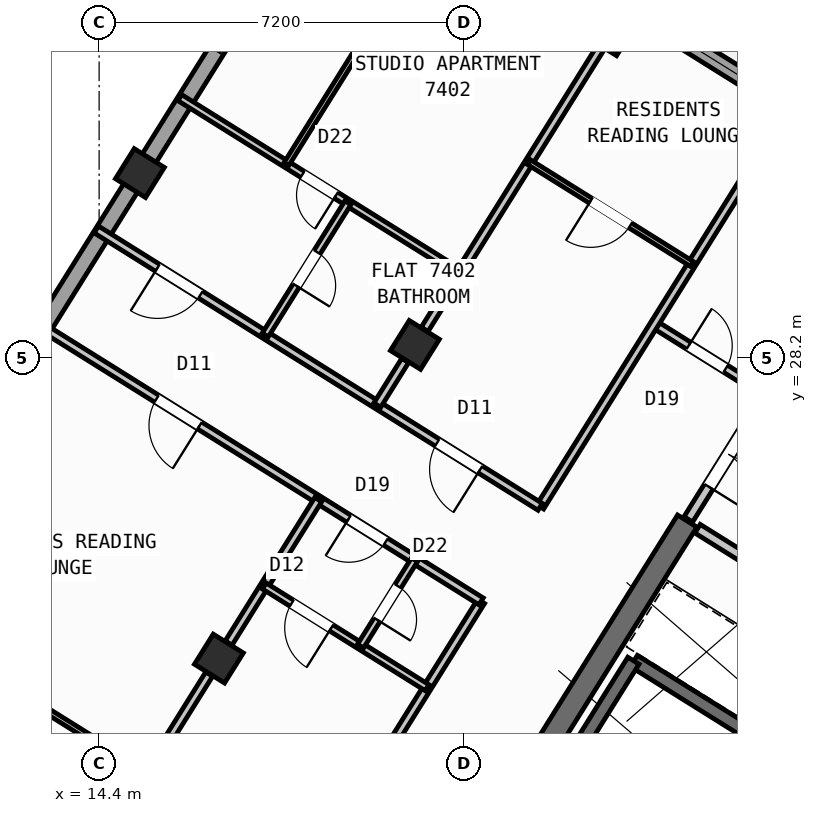
"""IFC4 building model, lengths in metres.
Left out: names, types, materials, properties, quantities, classifications, styles, units other than length and angle.
Written with IfcOpenShell. Run it as: python <this file> out.ifc"""

import sys

from ifc_helpers import new_model, si_unit, direction, frame, frame_2d, origin, origin_2d, place, context, subcontext, project, spatial, rectangle, hollow_rectangle, extrude, source, transform, mapped, element, fill, save


model = new_model("IFC4")
c1 = context("Model", 3, precision=1e-05, world=origin(), true_north=direction((0.0, 1.0)))
c2 = subcontext(c1, "Body", "Model", "MODEL_VIEW")
j1 = project(units=[si_unit("LENGTHUNIT", "METRE"), si_unit("PLANEANGLEUNIT", "RADIAN")], contexts=[c1])
p1 = place(None, origin())
s1 = spatial("IfcSite", under=j1, at=p1, CompositionType="ELEMENT")
p2 = place(p1, origin())
s2 = spatial("IfcBuilding", under=s1, at=p2, CompositionType="ELEMENT")
p3 = place(p2, frame((0.0, 0.0, 291.6)))
s3 = spatial("IfcBuildingStorey", under=s2, at=p3, CompositionType="ELEMENT", Elevation=291.6)
p4 = place(p3, frame((26.007, 24.976, 0.0), z_axis=(0.0, 0.0, 1.0), x_axis=(-0.529931155655, -0.848040665456, 0.0)))
e1 = element("IfcWall", 1, at=p4, inside=s3, PredefinedType="SHEAR", context=c2, shape_type="SweptSolid", body=[
    extrude(rectangle(XDim=6.475, YDim=0.45, at=frame_2d((3.238, 0.0))), origin(), (0.0, 0.0, 1.0), 3.35),
])
m1 = source(origin(), c2, "Body", "SweptSolid", [
    extrude(hollow_rectangle(XDim=0.7, YDim=0.7, WallThickness=0.028, at=origin_2d()), origin(), (0.0, 0.0, 1.0), 3.6),
])
for number, where, z_axis, x_axis in (
    (2, (24.5, 34.643, 0.0), (0.0, 0.0, 1.0), (-0.848, 0.53, 0.0)),
    (3, (20.632, 28.452, 0.0), (0.0, 0.0, 1.0), (-0.848, 0.53, 0.0)),
    (4, (16.764, 22.261, 0.0), (0.0, 0.0, 1.0), (-0.848, 0.53, 0.0)),
    (5, (15.205, 31.844, 0.0), (0.0, 0.0, 1.0), (-0.848, 0.53, 0.0)),
):
    element("IfcColumn", number, at=place(p3, frame(where, z_axis=z_axis, x_axis=x_axis)), inside=s3, PredefinedType="COLUMN", context=c2, shape_type="MappedRepresentation", body=[
        mapped(m1, transform((0.0, 0.0, 0.0), scale=1.0)),
    ])
p5 = place(p3, frame((7.842, 20.061, 0.0), z_axis=(0.0, 0.0, 1.0), x_axis=(0.529915577903, 0.84805039962, 0.0)))
e6 = element("IfcWall", 6, at=p5, inside=s3, PredefinedType="STANDARD", context=c2, shape_type="SweptSolid", body=[
    extrude(rectangle(XDim=21.587, YDim=0.32, at=frame_2d((10.794, 0.0))), origin(), (0.0, 0.0, 1.0), 2.875),
])
p6 = place(p5, frame((1.368, 0.0, 0.9)))
e7 = element("IfcOpeningElement", 7, at=p6, cuts=e6, PredefinedType="OPENING", context=c2, shape_type="SweptSolid", body=[
    extrude(rectangle(XDim=1.65, YDim=1.45, at=frame_2d((0.825, 0.725))), frame((0.0, 0.17, 0.0), z_axis=(0.0, -1.0, 0.0), x_axis=(1.0, 0.0, 0.0)), (0.0, 0.0, 1.0), 0.34),
])
p7 = place(p5, frame((4.71, 0.0, 1.0)))
e8 = element("IfcOpeningElement", 8, at=p7, cuts=e6, PredefinedType="OPENING", context=c2, shape_type="SweptSolid", body=[
    extrude(rectangle(XDim=0.9, YDim=1.25, at=frame_2d((0.45, 0.625))), frame((0.0, 0.17, 0.0), z_axis=(0.0, -1.0, 0.0), x_axis=(1.0, 0.0, 0.0)), (0.0, 0.0, 1.0), 0.34),
])
p8 = place(p5, frame((7.554, 0.0, 0.95)))
e9 = element("IfcOpeningElement", 9, at=p8, cuts=e6, PredefinedType="OPENING", context=c2, shape_type="SweptSolid", body=[
    extrude(rectangle(XDim=1.95, YDim=1.35, at=frame_2d((0.975, 0.675))), frame((0.0, 0.17, 0.0), z_axis=(0.0, -1.0, 0.0), x_axis=(1.0, 0.0, 0.0)), (0.0, 0.0, 1.0), 0.34),
])
p9 = place(p5, frame((16.744, 0.0, 1.0)))
e10 = element("IfcOpeningElement", 10, at=p9, cuts=e6, PredefinedType="OPENING", context=c2, shape_type="SweptSolid", body=[
    extrude(rectangle(XDim=0.9, YDim=1.25, at=frame_2d((0.45, 0.625))), frame((0.0, 0.17, 0.0), z_axis=(0.0, -1.0, 0.0), x_axis=(1.0, 0.0, 0.0)), (0.0, 0.0, 1.0), 0.34),
])
p10 = place(p5, frame((18.944, 0.0, 1.0)))
e11 = element("IfcOpeningElement", 11, at=p10, cuts=e6, PredefinedType="OPENING", context=c2, shape_type="SweptSolid", body=[
    extrude(rectangle(XDim=0.9, YDim=1.25, at=frame_2d((0.45, 0.625))), frame((0.0, 0.17, 0.0), z_axis=(0.0, -1.0, 0.0), x_axis=(1.0, 0.0, 0.0)), (0.0, 0.0, 1.0), 0.34),
])
p11 = place(p3, frame((19.566, 38.434, 0.0), z_axis=(0.0, 0.0, 1.0), x_axis=(0.84804567626, -0.529923136858, 0.0)))
e12 = element("IfcWall", 12, at=p11, inside=s3, PredefinedType="STANDARD", context=c2, shape_type="SweptSolid", body=[
    extrude(rectangle(XDim=25.188, YDim=0.32, at=frame_2d((12.594, 0.0))), origin(), (0.0, 0.0, 1.0), 3.35),
])
p12 = place(p11, frame((3.55, 0.0, 0.0)))
e13 = element("IfcOpeningElement", 13, at=p12, cuts=e12, PredefinedType="OPENING", context=c2, shape_type="SweptSolid", body=[
    extrude(rectangle(XDim=1.05, YDim=2.15, at=frame_2d((0.525, 1.075))), frame((0.0, 0.17, 0.0), z_axis=(0.0, -1.0, 0.0), x_axis=(1.0, 0.0, 0.0)), (0.0, 0.0, 1.0), 0.34),
])
p13 = place(p11, frame((7.349, 0.0, 0.9)))
e14 = element("IfcOpeningElement", 14, at=p13, cuts=e12, PredefinedType="OPENING", context=c2, shape_type="SweptSolid", body=[
    extrude(rectangle(XDim=1.65, YDim=1.45, at=frame_2d((0.825, 0.725))), frame((0.0, 0.17, 0.0), z_axis=(0.0, -1.0, 0.0), x_axis=(1.0, 0.0, 0.0)), (0.0, 0.0, 1.0), 0.34),
])
p14 = place(p11, frame((10.754, 0.0, 1.0)))
e15 = element("IfcOpeningElement", 15, at=p14, cuts=e12, PredefinedType="OPENING", context=c2, shape_type="SweptSolid", body=[
    extrude(rectangle(XDim=0.9, YDim=1.25, at=frame_2d((0.45, 0.625))), frame((0.0, 0.17, 0.0), z_axis=(0.0, -1.0, 0.0), x_axis=(1.0, 0.0, 0.0)), (0.0, 0.0, 1.0), 0.34),
])
p15 = place(p11, frame((15.169, 0.0, 0.95)))
e16 = element("IfcOpeningElement", 16, at=p15, cuts=e12, PredefinedType="OPENING", context=c2, shape_type="SweptSolid", body=[
    extrude(rectangle(XDim=1.95, YDim=1.35, at=frame_2d((0.975, 0.675))), frame((0.0, 0.17, 0.0), z_axis=(0.0, -1.0, 0.0), x_axis=(1.0, 0.0, 0.0)), (0.0, 0.0, 1.0), 0.34),
])
p16 = place(p11, frame((20.869, 0.0, 0.95)))
e17 = element("IfcOpeningElement", 17, at=p16, cuts=e12, PredefinedType="OPENING", context=c2, shape_type="SweptSolid", body=[
    extrude(rectangle(XDim=1.95, YDim=1.35, at=frame_2d((0.975, 0.675))), frame((0.0, 0.17, 0.0), z_axis=(0.0, -1.0, 0.0), x_axis=(1.0, 0.0, 0.0)), (0.0, 0.0, 1.0), 0.34),
])
p17 = place(p3, frame((31.28, 18.261, 0.0), z_axis=(0.0, 0.0, 1.0), x_axis=(-0.848051618787, 0.529913626805, 0.0)))
e18 = element("IfcWall", 18, at=p17, inside=s3, PredefinedType="SHEAR", context=c2, shape_type="SweptSolid", body=[
    extrude(rectangle(XDim=7.46, YDim=0.26, at=frame_2d((3.73, 0.0))), origin(), (0.0, 0.0, 1.0), 3.35),
])
p18 = place(p17, frame((0.36, 0.0, 0.0)))
e19 = element("IfcOpeningElement", 19, at=p18, cuts=e18, PredefinedType="OPENING", context=c2, shape_type="SweptSolid", body=[
    extrude(rectangle(XDim=0.86, YDim=2.05, at=frame_2d((0.43, 1.025))), frame((0.0, 0.14, 0.0), z_axis=(0.0, -1.0, 0.0), x_axis=(1.0, 0.0, 0.0)), (0.0, 0.0, 1.0), 0.28),
])
p19 = place(p3, frame((24.945, 22.22, 0.0), z_axis=(0.0, 0.0, 1.0), x_axis=(-0.529908658664, -0.84805472316, 0.0)))
e20 = element("IfcWall", 20, at=p19, inside=s3, PredefinedType="SHEAR", context=c2, shape_type="SweptSolid", body=[
    extrude(rectangle(XDim=3.16, YDim=0.26, at=frame_2d((1.58, 0.0))), origin(), (0.0, 0.0, 1.0), 3.35),
])
p20 = place(p3, frame((31.525, 21.504, 0.0), z_axis=(0.0, 0.0, 1.0), x_axis=(-0.848042066329, 0.529928913853, 0.0)))
e21 = element("IfcWall", 21, at=p20, inside=s3, PredefinedType="STANDARD", context=c2, shape_type="SweptSolid", body=[
    extrude(rectangle(XDim=6.268, YDim=0.2, at=frame_2d((3.134, 0.0))), origin(), (0.0, 0.0, 1.0), 3.34),
])
p21 = place(p20, frame((4.4, 0.0, 0.0)))
e22 = element("IfcOpeningElement", 22, at=p21, cuts=e21, PredefinedType="OPENING", context=c2, shape_type="SweptSolid", body=[
    extrude(rectangle(XDim=0.86, YDim=2.05, at=frame_2d((0.43, 1.025))), frame((0.0, 0.11, 0.0), z_axis=(0.0, -1.0, 0.0), x_axis=(1.0, 0.0, 0.0)), (0.0, 0.0, 1.0), 0.22),
])
p22 = place(p20, frame((1.45, 0.0, 0.0)))
e23 = element("IfcOpeningElement", 23, at=p22, cuts=e21, PredefinedType="OPENING", context=c2, shape_type="SweptSolid", body=[
    extrude(rectangle(XDim=0.86, YDim=2.05, at=frame_2d((0.43, 1.025))), frame((0.0, 0.11, 0.0), z_axis=(0.0, -1.0, 0.0), x_axis=(1.0, 0.0, 0.0)), (0.0, 0.0, 1.0), 0.22),
])
p23 = place(p3, frame((27.596, 27.52, 0.0), z_axis=(0.0, 0.0, 1.0), x_axis=(-0.529865479138, -0.848081702443, 0.0)))
e24 = element("IfcWall", 24, at=p23, inside=s3, PredefinedType="STANDARD", context=c2, shape_type="SweptSolid", body=[
    extrude(rectangle(XDim=2.96, YDim=0.2, at=frame_2d((1.48, 0.0))), origin(), (0.0, 0.0, 1.0), 3.34),
])
p24 = place(p23, frame((0.7, 0.0, 0.0)))
e25 = element("IfcOpeningElement", 25, at=p24, cuts=e24, PredefinedType="OPENING", context=c2, shape_type="SweptSolid", body=[
    extrude(rectangle(XDim=1.5, YDim=2.15, at=frame_2d((0.75, 1.075))), frame((0.0, 0.11, 0.0), z_axis=(0.0, -1.0, 0.0), x_axis=(1.0, 0.0, 0.0)), (0.0, 0.0, 1.0), 0.22),
])
p25 = place(p3, frame((27.57, 27.478, 0.0), z_axis=(0.0, 0.0, 1.0), x_axis=(-0.848050851465, 0.529914854792, 0.0)))
e26 = element("IfcWall", 26, at=p25, inside=s3, PredefinedType="PARTITIONING", context=c2, shape_type="SweptSolid", body=[
    extrude(rectangle(XDim=2.61, YDim=0.16, at=frame_2d((1.305, 0.0))), origin(), (0.0, 0.0, 1.0), 3.34),
])
p26 = place(p25, frame((0.95, 0.0, 0.0)))
e27 = element("IfcOpeningElement", 27, at=p26, cuts=e26, PredefinedType="OPENING", context=c2, shape_type="SweptSolid", body=[
    extrude(rectangle(XDim=0.86, YDim=2.05, at=frame_2d((0.43, 1.025))), frame((0.0, 0.09, 0.0), z_axis=(0.0, -1.0, 0.0), x_axis=(1.0, 0.0, 0.0)), (0.0, 0.0, 1.0), 0.18),
])
p27 = place(p3, frame((27.953, 33.016, 0.0), z_axis=(0.0, 0.0, 1.0), x_axis=(-0.529903001606, -0.848058257957, 0.0)))
e28 = element("IfcWall", 28, at=p27, inside=s3, PredefinedType="PARTITIONING", context=c2, shape_type="SweptSolid", body=[
    extrude(rectangle(XDim=9.15, YDim=0.16, at=frame_2d((4.575, 0.0))), origin(), (0.0, 0.0, 1.0), 3.34),
])
p28 = place(p3, frame((21.938, 23.391, 0.0), z_axis=(0.0, 0.0, 1.0), x_axis=(-0.529924725692, -0.848044683434, 0.0)))
e29 = element("IfcWall", 29, at=p28, inside=s3, PredefinedType="PARTITIONING", context=c2, shape_type="SweptSolid", body=[
    extrude(rectangle(XDim=10.35, YDim=0.16, at=frame_2d((5.175, 0.0))), origin(), (0.0, 0.0, 1.0), 3.34),
])
p29 = place(p3, frame((23.104, 25.256, 0.0), z_axis=(0.0, 0.0, 1.0), x_axis=(-0.848043444964, 0.529926707624, 0.0)))
e30 = element("IfcWall", 30, at=p29, inside=s3, PredefinedType="PARTITIONING", context=c2, shape_type="SweptSolid", body=[
    extrude(rectangle(XDim=10.33, YDim=0.16, at=frame_2d((5.165, 0.0))), origin(), (0.0, 0.0, 1.0), 3.34),
])
p30 = place(p29, frame((1.395, 0.0, 0.0)))
e31 = element("IfcOpeningElement", 31, at=p30, cuts=e30, PredefinedType="OPENING", context=c2, shape_type="SweptSolid", body=[
    extrude(rectangle(XDim=1.0, YDim=2.1, at=frame_2d((0.5, 1.05))), frame((0.0, 0.09, 0.0), z_axis=(0.0, -1.0, 0.0), x_axis=(1.0, 0.0, 0.0)), (0.0, 0.0, 1.0), 0.18),
])
p31 = place(p29, frame((7.904, 0.0, 0.0)))
e32 = element("IfcOpeningElement", 32, at=p31, cuts=e30, PredefinedType="OPENING", context=c2, shape_type="SweptSolid", body=[
    extrude(rectangle(XDim=1.0, YDim=2.1, at=frame_2d((0.5, 1.05))), frame((0.0, 0.09, 0.0), z_axis=(0.0, -1.0, 0.0), x_axis=(1.0, 0.0, 0.0)), (0.0, 0.0, 1.0), 0.18),
])
p32 = place(p3, frame((21.938, 23.391, 0.0), z_axis=(0.0, 0.0, 1.0), x_axis=(-0.848050081784, 0.529916086552, 0.0)))
e33 = element("IfcWall", 33, at=p32, inside=s3, PredefinedType="PARTITIONING", context=c2, shape_type="SweptSolid", body=[
    extrude(rectangle(XDim=10.33, YDim=0.16, at=frame_2d((5.165, 0.0))), origin(), (0.0, 0.0, 1.0), 3.34),
])
p33 = place(p32, frame((2.22, 0.0, 0.0)))
e34 = element("IfcOpeningElement", 34, at=p33, cuts=e33, PredefinedType="OPENING", context=c2, shape_type="SweptSolid", body=[
    extrude(rectangle(XDim=0.86, YDim=2.05, at=frame_2d((0.43, 1.025))), frame((0.0, 0.09, 0.0), z_axis=(0.0, -1.0, 0.0), x_axis=(1.0, 0.0, 0.0)), (0.0, 0.0, 1.0), 0.18),
])
p34 = place(p32, frame((6.55, 0.0, 0.0)))
e35 = element("IfcOpeningElement", 35, at=p34, cuts=e33, PredefinedType="OPENING", context=c2, shape_type="SweptSolid", body=[
    extrude(rectangle(XDim=1.0, YDim=2.1, at=frame_2d((0.5, 1.05))), frame((0.0, 0.09, 0.0), z_axis=(0.0, -1.0, 0.0), x_axis=(1.0, 0.0, 0.0)), (0.0, 0.0, 1.0), 0.18),
])
p35 = place(p3, frame((18.724, 25.399, 0.0), z_axis=(0.0, 0.0, 1.0), x_axis=(-0.529952920244, -0.848027064618, 0.0)))
e36 = element("IfcWall", 36, at=p35, inside=s3, PredefinedType="PARTITIONING", context=c2, shape_type="SweptSolid", body=[
    extrude(rectangle(XDim=3.338, YDim=0.16, at=frame_2d((1.669, 0.0))), origin(), (0.0, 0.0, 1.0), 2.875),
])
p36 = place(p3, frame((16.572, 21.954, 0.0), z_axis=(0.0, 0.0, 1.0), x_axis=(-0.529904903214, -0.848057069748, 0.0)))
e37 = element("IfcWall", 37, at=p36, inside=s3, PredefinedType="PARTITIONING", context=c2, shape_type="SweptSolid", body=[
    extrude(rectangle(XDim=5.601, YDim=0.16, at=frame_2d((2.801, 0.0))), origin(), (0.0, 0.0, 1.0), 2.875),
])
p37 = place(p3, frame((20.873, 21.686, 0.0), z_axis=(0.0, 0.0, 1.0), x_axis=(-0.84803087207, 0.529946827537, 0.0)))
e38 = element("IfcWall", 38, at=p37, inside=s3, PredefinedType="PLUMBINGWALL", context=c2, shape_type="SweptSolid", body=[
    extrude(rectangle(XDim=3.79, YDim=0.14, at=frame_2d((1.895, 0.0))), origin(), (0.0, 0.0, 1.0), 3.34),
])
p38 = place(p37, frame((2.23, 0.0, 0.0)))
e39 = element("IfcOpeningElement", 39, at=p38, cuts=e38, PredefinedType="OPENING", context=c2, shape_type="SweptSolid", body=[
    extrude(rectangle(XDim=0.92, YDim=2.08, at=frame_2d((0.46, 1.04))), frame((0.0, 0.08, 0.0), z_axis=(0.0, -1.0, 0.0), x_axis=(1.0, 0.0, 0.0)), (0.0, 0.0, 1.0), 0.16),
])
p39 = place(p3, frame((20.624, 24.212, 0.0), z_axis=(0.0, 0.0, 1.0), x_axis=(-0.529933431478, -0.848039243315, 0.0)))
e40 = element("IfcWall", 40, at=p39, inside=s3, PredefinedType="PLUMBINGWALL", context=c2, shape_type="SweptSolid", body=[
    extrude(rectangle(XDim=2.01, YDim=0.14, at=frame_2d((1.005, 0.0))), origin(), (0.0, 0.0, 1.0), 3.025),
])
p40 = place(p39, frame((0.615, 0.0, 0.0)))
e41 = element("IfcOpeningElement", 41, at=p40, cuts=e40, PredefinedType="OPENING", context=c2, shape_type="SweptSolid", body=[
    extrude(rectangle(XDim=0.78, YDim=2.05, at=frame_2d((0.39, 1.025))), frame((0.0, 0.08, 0.0), z_axis=(0.0, -1.0, 0.0), x_axis=(1.0, 0.0, 0.0)), (0.0, 0.0, 1.0), 0.16),
])
p41 = place(p3, frame((15.348, 19.995, 0.0), z_axis=(0.0, 0.0, 1.0), x_axis=(-0.848048787466, 0.529918157905, 0.0)))
e42 = element("IfcWall", 42, at=p41, inside=s3, PredefinedType="PARTITIONING", context=c2, shape_type="SweptSolid", body=[
    extrude(rectangle(XDim=6.52, YDim=0.11, at=frame_2d((3.26, 0.0))), origin(), (0.0, 0.0, 1.0), 3.34),
])
p42 = place(p41, frame((2.8, 0.0, 0.0)))
e43 = element("IfcOpeningElement", 43, at=p42, cuts=e42, PredefinedType="OPENING", context=c2, shape_type="SweptSolid", body=[
    extrude(rectangle(XDim=0.92, YDim=2.08, at=frame_2d((0.46, 1.04))), frame((0.0, 0.065, 0.0), z_axis=(0.0, -1.0, 0.0), x_axis=(1.0, 0.0, 0.0)), (0.0, 0.0, 1.0), 0.13),
])
p43 = place(p3, frame((24.309, 34.336, 0.0), z_axis=(0.0, 0.0, 1.0), x_axis=(-0.529895484599, -0.848062954858, 0.0)))
e44 = element("IfcWall", 44, at=p43, inside=s3, PredefinedType="PARTITIONING", context=c2, shape_type="SweptSolid", body=[
    extrude(rectangle(XDim=6.576, YDim=0.16, at=frame_2d((3.288, 0.0))), origin(), (0.0, 0.0, 1.0), 2.875),
])
p44 = place(p3, frame((20.44, 28.145, 0.0), z_axis=(0.0, 0.0, 1.0), x_axis=(-0.529977795385, -0.848011519025, 0.0)))
e45 = element("IfcWall", 45, at=p44, inside=s3, PredefinedType="PARTITIONING", context=c2, shape_type="SweptSolid", body=[
    extrude(rectangle(XDim=1.038, YDim=0.16, at=frame_2d((0.519, 0.0))), origin(), (0.0, 0.0, 1.0), 2.875),
])
p45 = place(p3, frame((26.099, 30.05, 0.0), z_axis=(0.0, 0.0, 1.0), x_axis=(-0.84803087207, 0.529946827537, 0.0)))
e46 = element("IfcWall", 46, at=p45, inside=s3, PredefinedType="PARTITIONING", context=c2, shape_type="SweptSolid", body=[
    extrude(rectangle(XDim=3.79, YDim=0.11, at=frame_2d((1.895, 0.0))), origin(), (0.0, 0.0, 1.0), 3.34),
])
p46 = place(p45, frame((1.435, 0.0, 0.0)))
e47 = element("IfcOpeningElement", 47, at=p46, cuts=e46, PredefinedType="OPENING", context=c2, shape_type="SweptSolid", body=[
    extrude(rectangle(XDim=0.92, YDim=2.08, at=frame_2d((0.46, 1.04))), frame((0.0, 0.065, 0.0), z_axis=(0.0, -1.0, 0.0), x_axis=(1.0, 0.0, 0.0)), (0.0, 0.0, 1.0), 0.13),
])
p47 = place(p3, frame((21.522, 29.877, 0.0), z_axis=(0.0, 0.0, 1.0), x_axis=(-0.848048787466, 0.529918157905, 0.0)))
e48 = element("IfcWall", 48, at=p47, inside=s3, PredefinedType="PLUMBINGWALL", context=c2, shape_type="SweptSolid", body=[
    extrude(rectangle(XDim=6.52, YDim=0.14, at=frame_2d((3.26, 0.0))), origin(), (0.0, 0.0, 1.0), 3.34),
])
p48 = place(p47, frame((2.885, 0.0, 0.0)))
e49 = element("IfcOpeningElement", 49, at=p48, cuts=e48, PredefinedType="OPENING", context=c2, shape_type="SweptSolid", body=[
    extrude(rectangle(XDim=0.78, YDim=2.05, at=frame_2d((0.39, 1.025))), frame((0.0, 0.08, 0.0), z_axis=(0.0, -1.0, 0.0), x_axis=(1.0, 0.0, 0.0)), (0.0, 0.0, 1.0), 0.16),
])
p49 = place(p3, frame((19.311, 31.259, 0.0), z_axis=(0.0, 0.0, 1.0), x_axis=(-0.52989206052, -0.848065094316, 0.0)))
e50 = element("IfcWall", 50, at=p49, inside=s3, PredefinedType="PLUMBINGWALL", context=c2, shape_type="SweptSolid", body=[
    extrude(rectangle(XDim=3.08, YDim=0.14, at=frame_2d((1.54, 0.0))), origin(), (0.0, 0.0, 1.0), 3.34),
])
p50 = place(p49, frame((1.15, 0.0, 0.0)))
e51 = element("IfcOpeningElement", 51, at=p50, cuts=e50, PredefinedType="OPENING", context=c2, shape_type="SweptSolid", body=[
    extrude(rectangle(XDim=0.78, YDim=2.05, at=frame_2d((0.39, 1.025))), frame((0.0, 0.08, 0.0), z_axis=(0.0, -1.0, 0.0), x_axis=(1.0, 0.0, 0.0)), (0.0, 0.0, 1.0), 0.16),
])
p51 = place(p3, frame((21.454, 37.395, 0.0), z_axis=(0.0, 0.0, 1.0), x_axis=(-0.529922785174, -0.848045896018, 0.0)))
e52 = element("IfcWall", 52, at=p51, inside=s3, PredefinedType="PARTITIONING", context=c2, shape_type="SweptSolid", body=[
    extrude(rectangle(XDim=6.34, YDim=0.11, at=frame_2d((3.17, 0.0))), origin(), (0.0, 0.0, 1.0), 3.025),
])
p52 = place(p51, frame((0.47, 0.0, 0.0)))
e53 = element("IfcOpeningElement", 53, at=p52, cuts=e52, PredefinedType="OPENING", context=c2, shape_type="SweptSolid", body=[
    extrude(rectangle(XDim=0.92, YDim=2.08, at=frame_2d((0.46, 1.04))), frame((0.0, 0.065, 0.0), z_axis=(0.0, -1.0, 0.0), x_axis=(1.0, 0.0, 0.0)), (0.0, 0.0, 1.0), 0.13),
])
m2 = source(origin(), c2, "Body", "SweptSolid", [
    extrude(rectangle(XDim=1.65, YDim=1.45, at=frame_2d((0.825, 0.725))), frame((0.0, 0.03, 0.0), z_axis=(0.0, -1.0, 0.0), x_axis=(1.0, 0.0, 0.0)), (0.0, 0.0, 1.0), 0.06),
])
p53 = place(p13, origin())
e54 = element("IfcWindow", 54, at=p53, inside=s3, PartitioningType="SINGLE_PANEL", PredefinedType="WINDOW", context=c2, shape_type="MappedRepresentation", body=[
    mapped(m2, transform((0.0, 0.0, 0.0), scale=1.0)),
])
fill(e14, e54)
m3 = source(origin(), c2, "Body", "SweptSolid", [
    extrude(rectangle(XDim=0.86, YDim=2.05, at=frame_2d((0.43, 1.025))), frame((0.0, 0.025, 0.0), z_axis=(0.0, -1.0, 0.0), x_axis=(1.0, 0.0, 0.0)), (0.0, 0.0, 1.0), 0.05),
])
p54 = place(p26, frame((0.86, 0.0, 0.0), z_axis=(0.0, 0.0, 1.0), x_axis=(-1.0, 0.0, 0.0)))
e55 = element("IfcDoor", 55, at=p54, inside=s3, OperationType="SINGLE_SWING_LEFT", PredefinedType="DOOR", context=c2, shape_type="MappedRepresentation", body=[
    mapped(m3, transform((0.0, 0.0, 0.0), scale=1.0)),
])
fill(e27, e55)
m4 = source(origin(), c2, "Body", "SweptSolid", [
    extrude(rectangle(XDim=1.5, YDim=2.15, at=frame_2d((0.75, 1.075))), frame((0.0, 0.025, 0.0), z_axis=(0.0, -1.0, 0.0), x_axis=(1.0, 0.0, 0.0)), (0.0, 0.0, 1.0), 0.05),
])
p55 = place(p24, origin())
e56 = element("IfcDoor", 56, at=p55, inside=s3, OperationType="DOUBLE_DOOR_SINGLE_SWING", PredefinedType="DOOR", context=c2, shape_type="MappedRepresentation", body=[
    mapped(m4, transform((0.0, 0.0, 0.0), scale=1.0)),
])
fill(e25, e56)
p56 = place(p33, origin())
e57 = element("IfcDoor", 57, at=p56, inside=s3, OperationType="SINGLE_SWING_RIGHT", PredefinedType="DOOR", context=c2, shape_type="MappedRepresentation", body=[
    mapped(m3, transform((0.0, 0.0, 0.0), scale=1.0)),
])
fill(e34, e57)
m5 = source(origin(), c2, "Body", "SweptSolid", [
    extrude(rectangle(XDim=0.92, YDim=2.08, at=frame_2d((0.46, 1.04))), frame((0.0, 0.025, 0.0), z_axis=(0.0, -1.0, 0.0), x_axis=(1.0, 0.0, 0.0)), (0.0, 0.0, 1.0), 0.05),
])
p57 = place(p38, origin())
e58 = element("IfcDoor", 58, at=p57, inside=s3, OperationType="SINGLE_SWING_LEFT", PredefinedType="DOOR", context=c2, shape_type="MappedRepresentation", body=[
    mapped(m5, transform((0.0, 0.0, 0.0), scale=1.0)),
])
fill(e39, e58)
m6 = source(origin(), c2, "Body", "SweptSolid", [
    extrude(rectangle(XDim=0.78, YDim=2.05, at=frame_2d((0.39, 1.025))), frame((0.0, 0.025, 0.0), z_axis=(0.0, -1.0, 0.0), x_axis=(1.0, 0.0, 0.0)), (0.0, 0.0, 1.0), 0.05),
])
p58 = place(p40, origin())
e59 = element("IfcDoor", 59, at=p58, inside=s3, OperationType="SINGLE_SWING_RIGHT", PredefinedType="DOOR", context=c2, shape_type="MappedRepresentation", body=[
    mapped(m6, transform((0.0, 0.0, 0.0), scale=1.0)),
])
fill(e41, e59)
m7 = source(origin(), c2, "Body", "SweptSolid", [
    extrude(rectangle(XDim=1.0, YDim=2.1, at=frame_2d((0.5, 1.05))), frame((0.0, 0.025, 0.0), z_axis=(0.0, -1.0, 0.0), x_axis=(1.0, 0.0, 0.0)), (0.0, 0.0, 1.0), 0.05),
])
p59 = place(p34, origin())
e60 = element("IfcDoor", 60, at=p59, inside=s3, OperationType="SINGLE_SWING_LEFT", PredefinedType="DOOR", context=c2, shape_type="MappedRepresentation", body=[
    mapped(m7, transform((0.0, 0.0, 0.0), scale=1.0)),
])
fill(e35, e60)
p60 = place(p30, origin())
e61 = element("IfcDoor", 61, at=p60, inside=s3, OperationType="SINGLE_SWING_LEFT", PredefinedType="DOOR", context=c2, shape_type="MappedRepresentation", body=[
    mapped(m7, transform((0.0, 0.0, 0.0), scale=1.0)),
])
fill(e31, e61)
p61 = place(p46, origin())
e62 = element("IfcDoor", 62, at=p61, inside=s3, OperationType="SINGLE_SWING_RIGHT", PredefinedType="DOOR", context=c2, shape_type="MappedRepresentation", body=[
    mapped(m5, transform((0.0, 0.0, 0.0), scale=1.0)),
])
fill(e47, e62)
p62 = place(p31, origin())
e63 = element("IfcDoor", 63, at=p62, inside=s3, OperationType="SINGLE_SWING_RIGHT", PredefinedType="DOOR", context=c2, shape_type="MappedRepresentation", body=[
    mapped(m7, transform((0.0, 0.0, 0.0), scale=1.0)),
])
fill(e32, e63)
p63 = place(p48, origin())
e64 = element("IfcDoor", 64, at=p63, inside=s3, OperationType="SINGLE_SWING_LEFT", PredefinedType="DOOR", context=c2, shape_type="MappedRepresentation", body=[
    mapped(m6, transform((0.0, 0.0, 0.0), scale=1.0)),
])
fill(e49, e64)
p64 = place(p50, origin())
e65 = element("IfcDoor", 65, at=p64, inside=s3, OperationType="SINGLE_SWING_RIGHT", PredefinedType="DOOR", context=c2, shape_type="MappedRepresentation", body=[
    mapped(m6, transform((0.0, 0.0, 0.0), scale=1.0)),
])
fill(e51, e65)
save(model, sys.argv[1])
